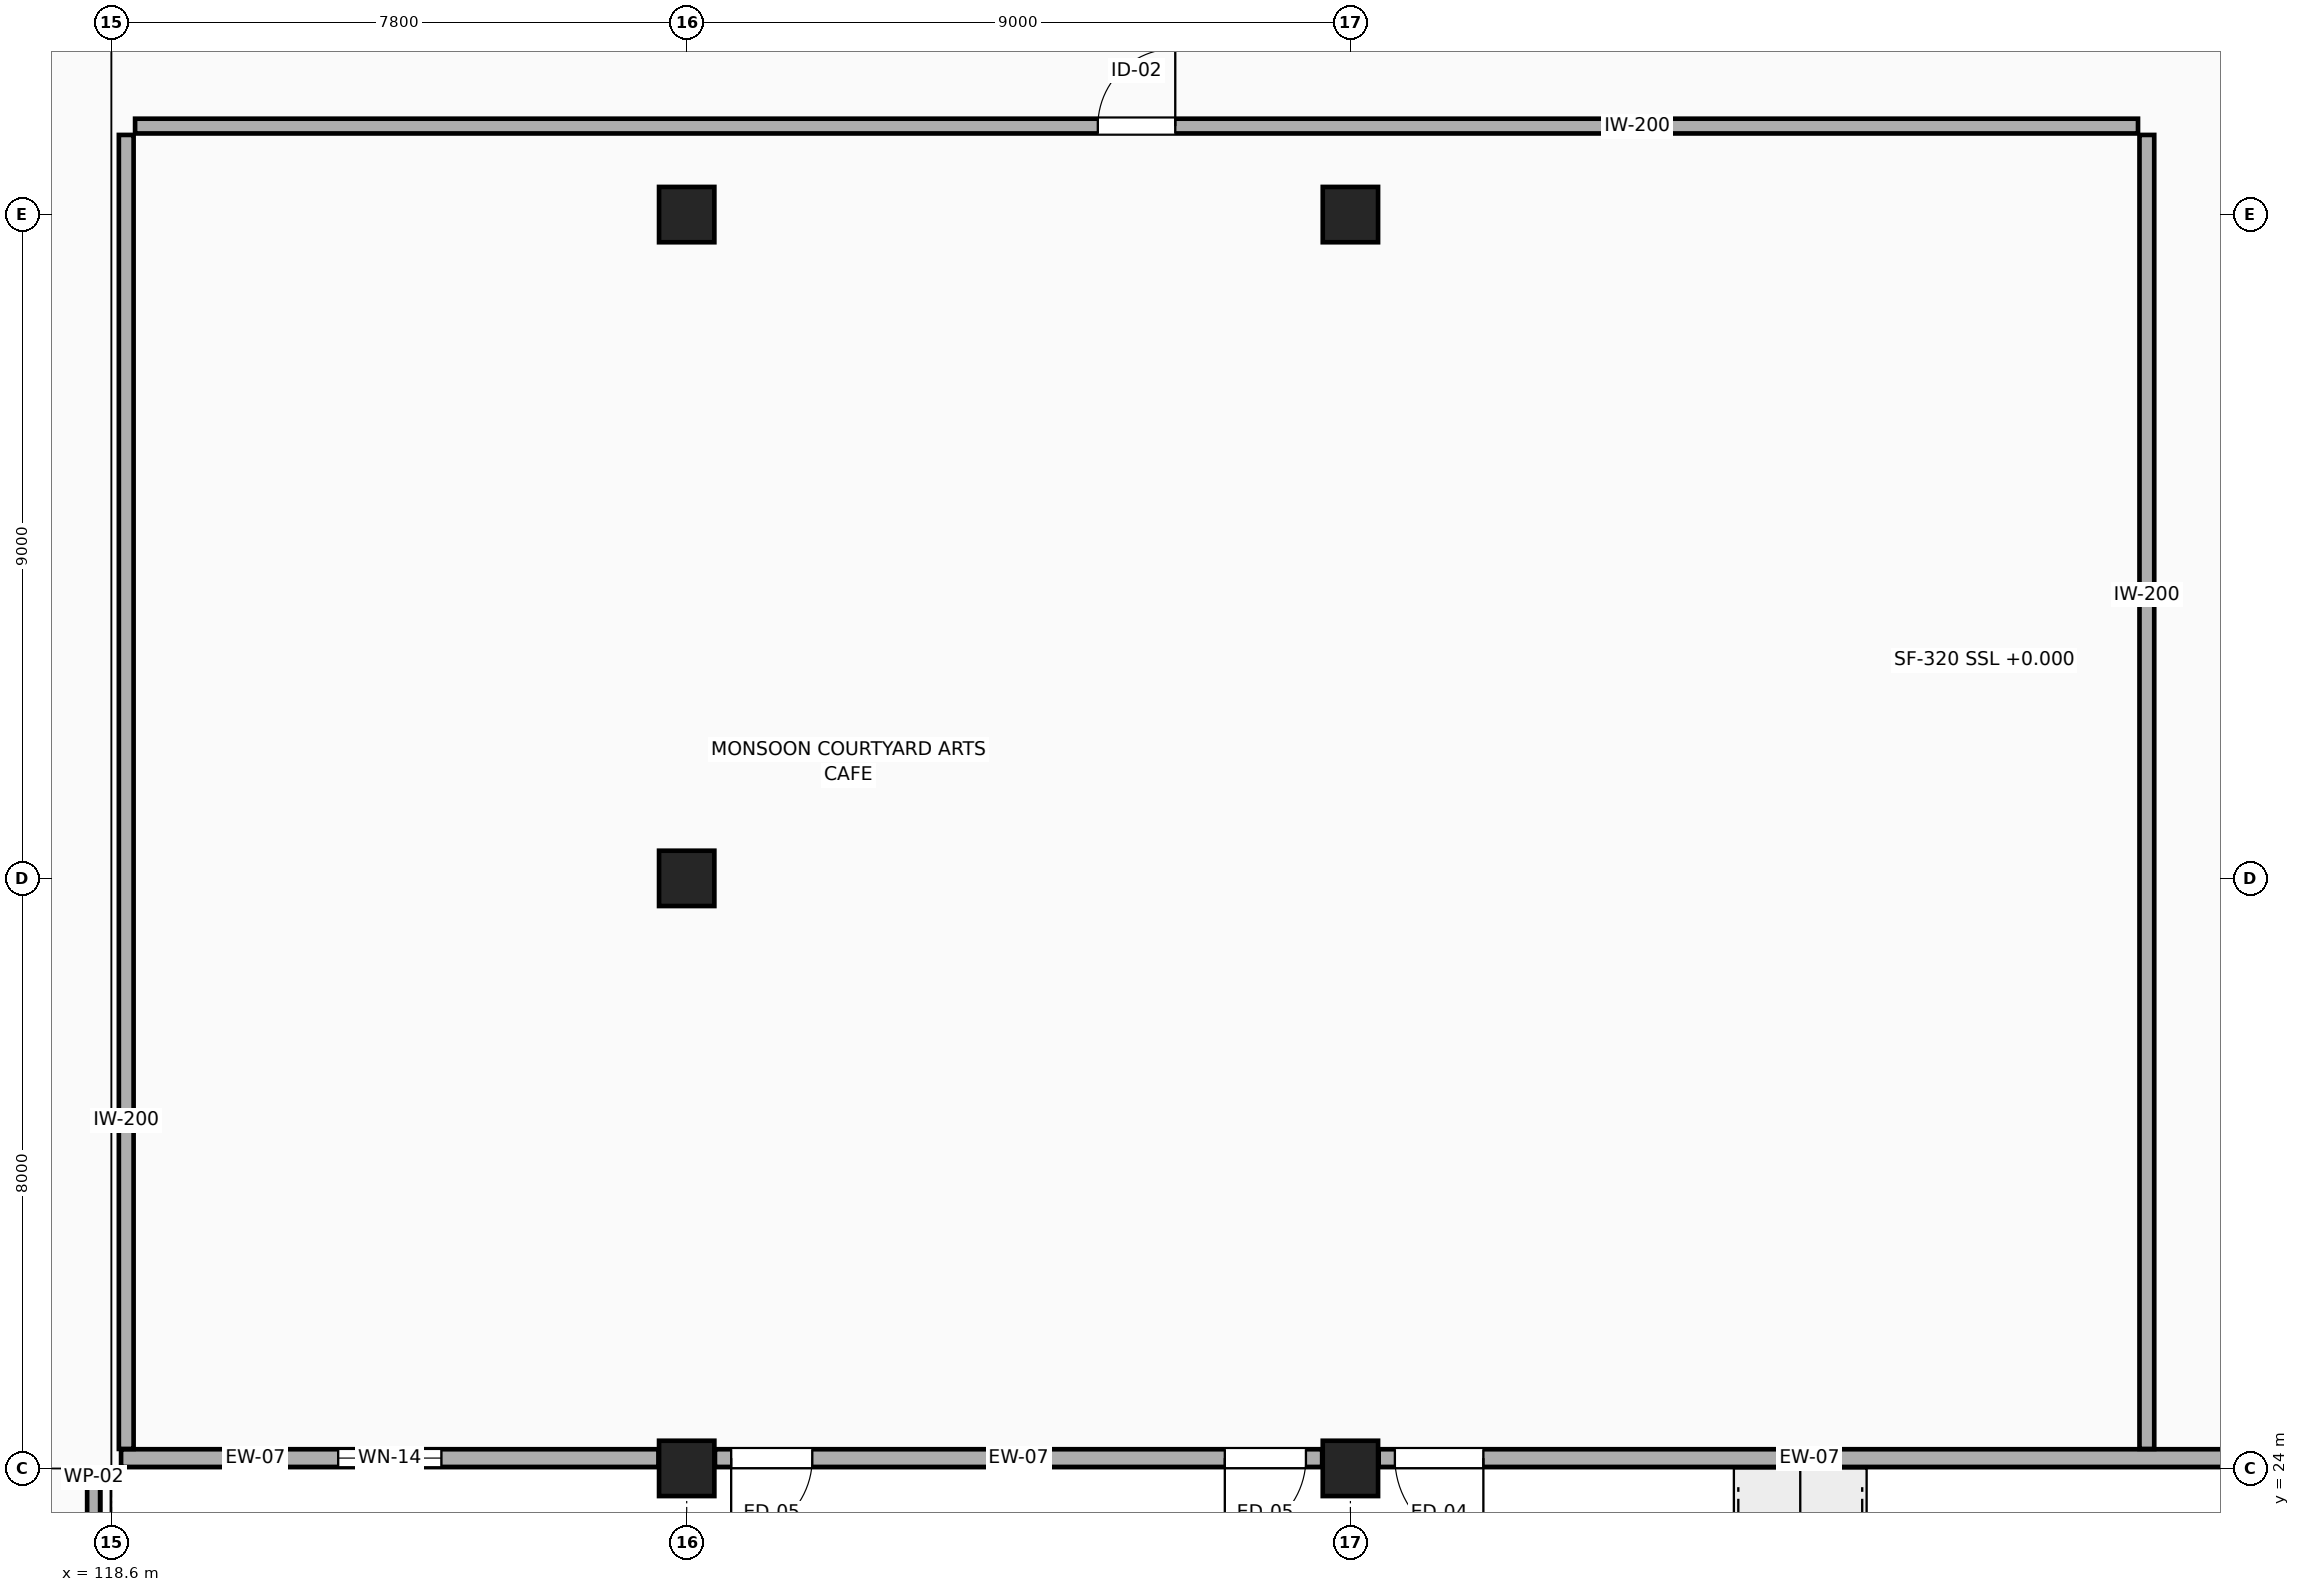
"""IFC4 building model, lengths in metres.
Left out: names, types, materials, properties, quantities, classifications, styles, units other than length and angle.
Written with IfcOpenShell. Run it as: python <this file> out.ifc"""

import sys

from ifc_helpers import new_model, si_unit, direction, frame, frame_2d, origin, origin_2d, place, context, subcontext, project, spatial, rectangle, extrude, element, fill, save


model = new_model("IFC4")
c1 = context("Model", 3, precision=1e-05, world=origin(), true_north=direction((0.0, 1.0)))
c2 = subcontext(c1, "Body", "Model", "MODEL_VIEW")
j1 = project(units=[si_unit("LENGTHUNIT", "METRE"), si_unit("PLANEANGLEUNIT", "RADIAN")], contexts=[c1])
p1 = place(None, origin())
s1 = spatial("IfcSite", under=j1, at=p1, CompositionType="ELEMENT")
p2 = place(p1, origin())
s2 = spatial("IfcBuilding", under=s1, at=p2, CompositionType="ELEMENT")
p3 = place(p2, origin())
s3 = spatial("IfcBuildingStorey", under=s2, at=p3, CompositionType="ELEMENT", Elevation=0.0)
for number, where, z_axis, x_axis in (
    (1, (126.4, 24.0, 0.0), (0.0, 0.0, 1.0), (1.0, 0.0, 0.0)),
    (2, (126.4, 32.0, 0.0), (0.0, 0.0, 1.0), (1.0, 0.0, 0.0)),
    (3, (126.4, 41.0, 0.0), (0.0, 0.0, 1.0), (1.0, 0.0, 0.0)),
    (4, (135.4, 24.0, 0.0), (0.0, 0.0, 1.0), (1.0, 0.0, 0.0)),
    (5, (135.4, 41.0, 0.0), (0.0, 0.0, 1.0), (1.0, 0.0, 0.0)),
):
    element("IfcColumn", number, at=place(p3, frame(where, z_axis=z_axis, x_axis=x_axis)), inside=s3, PredefinedType="COLUMN", context=c2, shape_type="SweptSolid", body=[
        extrude(rectangle(XDim=0.75, YDim=0.75, at=origin_2d()), origin(), (0.0, 0.0, 1.0), 5.4),
    ])
p4 = place(p3, frame((147.467, 24.14, 0.0), z_axis=(0.0, 0.0, 1.0), x_axis=(-1.0, 0.0, 0.0)))
e6 = element("IfcWall", 6, at=p4, inside=s3, PredefinedType="ELEMENTEDWALL", context=c2, shape_type="SweptSolid", body=[
    extrude(rectangle(XDim=11.684, YDim=0.24, at=frame_2d((5.842, 0.0))), origin(), (0.0, 0.0, 1.0), 4.355),
])
p5 = place(p4, frame((10.264, 0.0, 0.0)))
e7 = element("IfcOpeningElement", 7, at=p5, cuts=e6, PredefinedType="OPENING", context=c2, shape_type="SweptSolid", body=[
    extrude(rectangle(XDim=1.2, YDim=2.2, at=frame_2d((0.6, 1.1))), frame((0.0, 0.13, 0.0), z_axis=(0.0, -1.0, 0.0), x_axis=(1.0, 0.0, 0.0)), (0.0, 0.0, 1.0), 0.26),
])
p6 = place(p3, frame((135.017, 24.14, 0.0), z_axis=(0.0, 0.0, 1.0), x_axis=(-1.0, 0.0, 0.0)))
e8 = element("IfcWall", 8, at=p6, inside=s3, PredefinedType="ELEMENTEDWALL", context=c2, shape_type="SweptSolid", body=[
    extrude(rectangle(XDim=8.234, YDim=0.24, at=frame_2d((4.117, 0.0))), origin(), (0.0, 0.0, 1.0), 4.255),
])
p7 = place(p6, frame((0.22, 0.0, 0.0)))
e9 = element("IfcOpeningElement", 9, at=p7, cuts=e8, PredefinedType="OPENING", context=c2, shape_type="SweptSolid", body=[
    extrude(rectangle(XDim=1.1, YDim=2.2, at=frame_2d((0.55, 1.1))), frame((0.0, 0.13, 0.0), z_axis=(0.0, -1.0, 0.0), x_axis=(1.0, 0.0, 0.0)), (0.0, 0.0, 1.0), 0.26),
])
p8 = place(p6, frame((6.914, 0.0, 0.0)))
e10 = element("IfcOpeningElement", 10, at=p8, cuts=e8, PredefinedType="OPENING", context=c2, shape_type="SweptSolid", body=[
    extrude(rectangle(XDim=1.1, YDim=2.2, at=frame_2d((0.55, 1.1))), frame((0.0, 0.13, 0.0), z_axis=(0.0, -1.0, 0.0), x_axis=(1.0, 0.0, 0.0)), (0.0, 0.0, 1.0), 0.26),
])
p9 = place(p3, frame((126.017, 24.14, 0.0), z_axis=(0.0, 0.0, 1.0), x_axis=(-1.0, 0.0, 0.0)))
e11 = element("IfcWall", 11, at=p9, inside=s3, PredefinedType="ELEMENTEDWALL", context=c2, shape_type="SweptSolid", body=[
    extrude(rectangle(XDim=7.287, YDim=0.24, at=frame_2d((3.644, 0.0))), origin(), (0.0, 0.0, 1.0), 5.12),
])
p10 = place(p9, frame((2.943, 0.0, 0.95)))
e12 = element("IfcOpeningElement", 12, at=p10, cuts=e11, PredefinedType="OPENING", context=c2, shape_type="SweptSolid", body=[
    extrude(rectangle(XDim=1.4, YDim=1.5, at=frame_2d((0.7, 0.75))), frame((0.0, 0.13, 0.0), z_axis=(0.0, -1.0, 0.0), x_axis=(1.0, 0.0, 0.0)), (0.0, 0.0, 1.0), 0.26),
])
p11 = place(p3, frame((118.36, 23.88, 0.0), z_axis=(0.0, 0.0, 1.0), x_axis=(0.0, -1.0, 0.0)))
e13 = element("IfcWall", 13, at=p11, inside=s3, PredefinedType="PARAPET", context=c2, shape_type="SweptSolid", body=[
    extrude(rectangle(XDim=15.76, YDim=0.18, at=frame_2d((7.88, 0.0))), origin(), (0.0, 0.0, 1.0), 0.88),
])
p12 = place(p3, frame((118.92, 42.2, 0.0), z_axis=(0.0, 0.0, 1.0), x_axis=(1.0, 0.0, 0.0)))
e14 = element("IfcWall", 14, at=p12, inside=s3, PredefinedType="PARTITIONING", context=c2, shape_type="SweptSolid", body=[
    extrude(rectangle(XDim=27.16, YDim=0.2, at=frame_2d((13.58, 0.0))), origin(), (0.0, 0.0, 1.0), 5.11),
])
p13 = place(p12, frame((13.055, 0.0, 0.0)))
e15 = element("IfcOpeningElement", 15, at=p13, cuts=e14, PredefinedType="OPENING", context=c2, shape_type="SweptSolid", body=[
    extrude(rectangle(XDim=1.05, YDim=2.15, at=frame_2d((0.525, 1.075))), frame((0.0, 0.11, 0.0), z_axis=(0.0, -1.0, 0.0), x_axis=(1.0, 0.0, 0.0)), (0.0, 0.0, 1.0), 0.22),
])
p14 = place(p3, frame((146.2, 42.08, 0.0), z_axis=(0.0, 0.0, 1.0), x_axis=(0.0, -1.0, 0.0)))
e16 = element("IfcWall", 16, at=p14, inside=s3, PredefinedType="PARTITIONING", context=c2, shape_type="SweptSolid", body=[
    extrude(rectangle(XDim=17.816, YDim=0.2, at=frame_2d((8.908, 0.0))), origin(), (0.0, 0.0, 1.0), 5.11),
])
p15 = place(p3, frame((118.8, 24.264, 0.0), z_axis=(0.0, 0.0, 1.0), x_axis=(0.0, 1.0, 0.0)))
e17 = element("IfcWall", 17, at=p15, inside=s3, PredefinedType="PARTITIONING", context=c2, shape_type="SweptSolid", body=[
    extrude(rectangle(XDim=17.816, YDim=0.2, at=frame_2d((8.908, 0.0))), origin(), (0.0, 0.0, 1.0), 4.3),
])
p16 = place(p5, origin())
e18 = element("IfcDoor", 18, at=p16, inside=s3, OperationType="SINGLE_SWING_LEFT", PredefinedType="DOOR", context=c2, shape_type="SweptSolid", body=[
    extrude(rectangle(XDim=1.2, YDim=2.2, at=frame_2d((0.6, 1.1))), frame((0.0, 0.025, 0.0), z_axis=(0.0, -1.0, 0.0), x_axis=(1.0, 0.0, 0.0)), (0.0, 0.0, 1.0), 0.05),
])
fill(e7, e18)
p17 = place(p7, origin())
e19 = element("IfcDoor", 19, at=p17, inside=s3, OperationType="SINGLE_SWING_RIGHT", PredefinedType="DOOR", context=c2, shape_type="SweptSolid", body=[
    extrude(rectangle(XDim=1.1, YDim=2.2, at=frame_2d((0.55, 1.1))), frame((0.0, 0.025, 0.0), z_axis=(0.0, -1.0, 0.0), x_axis=(1.0, 0.0, 0.0)), (0.0, 0.0, 1.0), 0.05),
])
fill(e9, e19)
p18 = place(p8, origin())
e20 = element("IfcDoor", 20, at=p18, inside=s3, OperationType="SINGLE_SWING_RIGHT", PredefinedType="DOOR", context=c2, shape_type="SweptSolid", body=[
    extrude(rectangle(XDim=1.1, YDim=2.2, at=frame_2d((0.55, 1.1))), frame((0.0, 0.025, 0.0), z_axis=(0.0, -1.0, 0.0), x_axis=(1.0, 0.0, 0.0)), (0.0, 0.0, 1.0), 0.05),
])
fill(e10, e20)
p19 = place(p10, origin())
e21 = element("IfcWindow", 21, at=p19, inside=s3, PartitioningType="SINGLE_PANEL", PredefinedType="WINDOW", context=c2, shape_type="SweptSolid", body=[
    extrude(rectangle(XDim=1.4, YDim=1.5, at=frame_2d((0.7, 0.75))), frame((0.0, 0.03, 0.0), z_axis=(0.0, -1.0, 0.0), x_axis=(1.0, 0.0, 0.0)), (0.0, 0.0, 1.0), 0.06),
])
fill(e12, e21)
p20 = place(p13, origin())
e22 = element("IfcDoor", 22, at=p20, inside=s3, OperationType="SINGLE_SWING_RIGHT", PredefinedType="DOOR", context=c2, shape_type="SweptSolid", body=[
    extrude(rectangle(XDim=1.05, YDim=2.15, at=frame_2d((0.525, 1.075))), frame((0.0, 0.025, 0.0), z_axis=(0.0, -1.0, 0.0), x_axis=(1.0, 0.0, 0.0)), (0.0, 0.0, 1.0), 0.05),
])
fill(e15, e22)
save(model, sys.argv[1])
